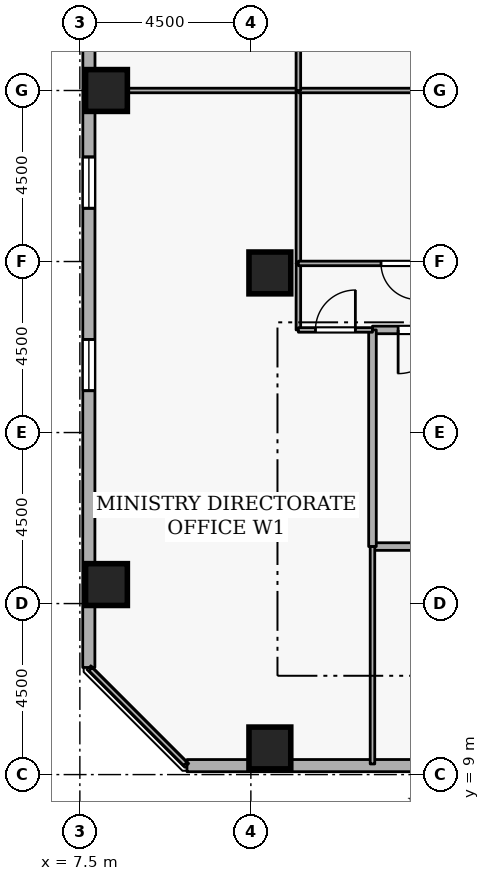
"""IFC4 building model, lengths in metres.
Left out: names, types, materials, properties, quantities, classifications, styles, units other than length and angle.
Written with IfcOpenShell. Run it as: python <this file> out.ifc"""

import sys

from ifc_helpers import new_model, si_unit, direction, frame, frame_2d, origin, origin_2d, place, context, subcontext, project, spatial, rectangle, extrude, element, fill, save


model = new_model("IFC4")
c1 = context("Model", 3, precision=1e-05, world=origin(), true_north=direction((0.0, 1.0)))
c2 = subcontext(c1, "Body", "Model", "MODEL_VIEW")
j1 = project(units=[si_unit("LENGTHUNIT", "METRE"), si_unit("PLANEANGLEUNIT", "RADIAN")], contexts=[c1])
p1 = place(None, origin())
s1 = spatial("IfcSite", under=j1, at=p1, CompositionType="ELEMENT")
p2 = place(p1, origin())
s2 = spatial("IfcBuilding", under=s1, at=p2, CompositionType="ELEMENT")
p3 = place(p2, frame((0.0, 0.0, 196.5)))
s3 = spatial("IfcBuildingStorey", under=s2, at=p3, CompositionType="ELEMENT", Elevation=196.5)
for number, where, z_axis, x_axis in (
    (1, (12.5, 9.7, 0.0), (0.0, 0.0, 1.0), (1.0, 0.0, 0.0)),
    (2, (8.2, 14.0, 0.0), (0.0, 0.0, 1.0), (1.0, 0.0, 0.0)),
    (3, (8.2, 27.0, 0.0), (0.0, 0.0, 1.0), (1.0, 0.0, 0.0)),
    (4, (12.5, 22.2, 0.0), (0.0, 0.0, 1.0), (1.0, 0.0, 0.0)),
):
    element("IfcColumn", number, at=place(p3, frame(where, z_axis=z_axis, x_axis=x_axis)), inside=s3, PredefinedType="COLUMN", context=c2, shape_type="SweptSolid", body=[
        extrude(rectangle(XDim=1.1, YDim=1.1, at=origin_2d()), origin(), (0.0, 0.0, 1.0), 3.6),
    ])
p4 = place(p3, frame((10.319, 9.235, 0.0), z_axis=(0.0, 0.0, 1.0), x_axis=(0.999999983007, 0.000184351399, 0.0)))
e5 = element("IfcWall", 5, at=p4, inside=s3, PredefinedType="STANDARD", context=c2, shape_type="SweptSolid", body=[
    extrude(rectangle(XDim=34.432, YDim=0.32, at=frame_2d((17.216, 0.0))), origin(), (0.0, 0.0, 1.0), 2.22),
])
p5 = place(p4, frame((6.6, 0.0, 0.72)))
e6 = element("IfcOpeningElement", 6, at=p5, cuts=e5, PredefinedType="OPENING", context=c2, shape_type="SweptSolid", body=[
    extrude(rectangle(XDim=1.35, YDim=1.05, at=frame_2d((0.675, 0.525))), frame((0.0, 0.17, 0.0), z_axis=(0.0, -1.0, 0.0), x_axis=(1.0, 0.0, 0.0)), (0.0, 0.0, 1.0), 0.34),
])
p6 = place(p4, frame((11.4, 0.0, 0.72)))
e7 = element("IfcOpeningElement", 7, at=p6, cuts=e5, PredefinedType="OPENING", context=c2, shape_type="SweptSolid", body=[
    extrude(rectangle(XDim=1.35, YDim=1.05, at=frame_2d((0.675, 0.525))), frame((0.0, 0.17, 0.0), z_axis=(0.0, -1.0, 0.0), x_axis=(1.0, 0.0, 0.0)), (0.0, 0.0, 1.0), 0.34),
])
p7 = place(p4, frame((21.0, 0.0, 0.72)))
e8 = element("IfcOpeningElement", 8, at=p7, cuts=e5, PredefinedType="OPENING", context=c2, shape_type="SweptSolid", body=[
    extrude(rectangle(XDim=1.35, YDim=1.05, at=frame_2d((0.675, 0.525))), frame((0.0, 0.17, 0.0), z_axis=(0.0, -1.0, 0.0), x_axis=(1.0, 0.0, 0.0)), (0.0, 0.0, 1.0), 0.34),
])
p8 = place(p4, frame((30.6, 0.0, 0.72)))
e9 = element("IfcOpeningElement", 9, at=p8, cuts=e5, PredefinedType="OPENING", context=c2, shape_type="SweptSolid", body=[
    extrude(rectangle(XDim=1.35, YDim=1.05, at=frame_2d((0.675, 0.525))), frame((0.0, 0.17, 0.0), z_axis=(0.0, -1.0, 0.0), x_axis=(1.0, 0.0, 0.0)), (0.0, 0.0, 1.0), 0.34),
])
p9 = place(p3, frame((7.742, 46.251, 0.0), z_axis=(0.0, 0.0, 1.0), x_axis=(-0.000184351399, -0.999999983007, 0.0)))
e10 = element("IfcWall", 10, at=p9, inside=s3, PredefinedType="STANDARD", context=c2, shape_type="SweptSolid", body=[
    extrude(rectangle(XDim=34.432, YDim=0.32, at=frame_2d((17.216, 0.0))), origin(), (0.0, 0.0, 1.0), 2.22),
])
p10 = place(p9, frame((1.8, 0.0, 0.72)))
e11 = element("IfcOpeningElement", 11, at=p10, cuts=e10, PredefinedType="OPENING", context=c2, shape_type="SweptSolid", body=[
    extrude(rectangle(XDim=1.35, YDim=1.05, at=frame_2d((0.675, 0.525))), frame((0.0, 0.17, 0.0), z_axis=(0.0, -1.0, 0.0), x_axis=(1.0, 0.0, 0.0)), (0.0, 0.0, 1.0), 0.34),
])
p11 = place(p9, frame((11.4, 0.0, 0.72)))
e12 = element("IfcOpeningElement", 12, at=p11, cuts=e10, PredefinedType="OPENING", context=c2, shape_type="SweptSolid", body=[
    extrude(rectangle(XDim=1.35, YDim=1.05, at=frame_2d((0.675, 0.525))), frame((0.0, 0.17, 0.0), z_axis=(0.0, -1.0, 0.0), x_axis=(1.0, 0.0, 0.0)), (0.0, 0.0, 1.0), 0.34),
])
p12 = place(p9, frame((16.2, 0.0, 0.72)))
e13 = element("IfcOpeningElement", 13, at=p12, cuts=e10, PredefinedType="OPENING", context=c2, shape_type="SweptSolid", body=[
    extrude(rectangle(XDim=1.35, YDim=1.05, at=frame_2d((0.675, 0.525))), frame((0.0, 0.17, 0.0), z_axis=(0.0, -1.0, 0.0), x_axis=(1.0, 0.0, 0.0)), (0.0, 0.0, 1.0), 0.34),
])
p13 = place(p9, frame((21.0, 0.0, 0.72)))
e14 = element("IfcOpeningElement", 14, at=p13, cuts=e10, PredefinedType="OPENING", context=c2, shape_type="SweptSolid", body=[
    extrude(rectangle(XDim=1.35, YDim=1.05, at=frame_2d((0.675, 0.525))), frame((0.0, 0.17, 0.0), z_axis=(0.0, -1.0, 0.0), x_axis=(1.0, 0.0, 0.0)), (0.0, 0.0, 1.0), 0.34),
])
p14 = place(p9, frame((25.8, 0.0, 0.72)))
e15 = element("IfcOpeningElement", 15, at=p14, cuts=e10, PredefinedType="OPENING", context=c2, shape_type="SweptSolid", body=[
    extrude(rectangle(XDim=1.35, YDim=1.05, at=frame_2d((0.675, 0.525))), frame((0.0, 0.17, 0.0), z_axis=(0.0, -1.0, 0.0), x_axis=(1.0, 0.0, 0.0)), (0.0, 0.0, 1.0), 0.34),
])
p15 = place(p3, frame((15.2, 15.0, 0.0), z_axis=(0.0, 0.0, 1.0), x_axis=(1.0, 0.0, 0.0)))
e16 = element("IfcWall", 16, at=p15, inside=s3, PredefinedType="STANDARD", context=c2, shape_type="SweptSolid", body=[
    extrude(rectangle(XDim=2.5, YDim=0.2, at=frame_2d((1.25, 0.0))), origin(), (0.0, 0.0, 1.0), 3.32),
])
p16 = place(p3, frame((17.7, 20.7, 0.0), z_axis=(0.0, 0.0, 1.0), x_axis=(-1.0, 0.0, 0.0)))
e17 = element("IfcWall", 17, at=p16, inside=s3, PredefinedType="STANDARD", context=c2, shape_type="SweptSolid", body=[
    extrude(rectangle(XDim=2.5, YDim=0.2, at=frame_2d((1.25, 0.0))), origin(), (0.0, 0.0, 1.0), 3.32),
])
p17 = place(p16, frame((0.675, 0.0, 0.0)))
e18 = element("IfcOpeningElement", 18, at=p17, cuts=e17, PredefinedType="OPENING", context=c2, shape_type="SweptSolid", body=[
    extrude(rectangle(XDim=1.15, YDim=2.1, at=frame_2d((0.575, 1.05))), frame((0.0, 0.11, 0.0), z_axis=(0.0, -1.0, 0.0), x_axis=(1.0, 0.0, 0.0)), (0.0, 0.0, 1.0), 0.22),
])
p18 = place(p3, frame((15.2, 20.7, 0.0), z_axis=(0.0, 0.0, 1.0), x_axis=(0.0, -1.0, 0.0)))
e19 = element("IfcWall", 19, at=p18, inside=s3, PredefinedType="STANDARD", context=c2, shape_type="SweptSolid", body=[
    extrude(rectangle(XDim=5.7, YDim=0.2, at=frame_2d((2.85, 0.0))), origin(), (0.0, 0.0, 1.0), 3.32),
])
p19 = place(p3, frame((7.78, 27.0, 0.0), z_axis=(0.0, 0.0, 1.0), x_axis=(1.0, 0.0, 0.0)))
e20 = element("IfcWall", 20, at=p19, inside=s3, PredefinedType="PARTITIONING", context=c2, shape_type="SweptSolid", body=[
    extrude(rectangle(XDim=5.47, YDim=0.12, at=frame_2d((2.735, 0.0))), origin(), (0.0, 0.0, 1.0), 1.785),
])
p20 = place(p3, frame((13.25, 27.0, 0.0), z_axis=(0.0, 0.0, 1.0), x_axis=(0.0, -1.0, 0.0)))
e21 = element("IfcWall", 21, at=p20, inside=s3, PredefinedType="PARTITIONING", context=c2, shape_type="SweptSolid", body=[
    extrude(rectangle(XDim=4.55, YDim=0.12, at=frame_2d((2.275, 0.0))), origin(), (0.0, 0.0, 1.0), 3.32),
])
p21 = place(p3, frame((13.25, 22.45, 0.0), z_axis=(0.0, 0.0, 1.0), x_axis=(0.0, -1.0, 0.0)))
e22 = element("IfcWall", 22, at=p21, inside=s3, PredefinedType="PARTITIONING", context=c2, shape_type="SweptSolid", body=[
    extrude(rectangle(XDim=1.75, YDim=0.12, at=frame_2d((0.875, 0.0))), origin(), (0.0, 0.0, 1.0), 3.32),
])
p22 = place(p3, frame((13.25, 20.7, 0.0), z_axis=(0.0, 0.0, 1.0), x_axis=(1.0, 0.0, 0.0)))
e23 = element("IfcWall", 23, at=p22, inside=s3, PredefinedType="PARTITIONING", context=c2, shape_type="SweptSolid", body=[
    extrude(rectangle(XDim=1.95, YDim=0.12, at=frame_2d((0.975, 0.0))), origin(), (0.0, 0.0, 1.0), 3.32),
])
p23 = place(p22, frame((0.45, 0.0, 0.0)))
e24 = element("IfcOpeningElement", 24, at=p23, cuts=e23, PredefinedType="OPENING", context=c2, shape_type="SweptSolid", body=[
    extrude(rectangle(XDim=1.05, YDim=2.1, at=frame_2d((0.525, 1.05))), frame((0.0, 0.07, 0.0), z_axis=(0.0, -1.0, 0.0), x_axis=(1.0, 0.0, 0.0)), (0.0, 0.0, 1.0), 0.14),
])
p24 = place(p3, frame((15.2, 15.0, 0.0), z_axis=(0.0, 0.0, 1.0), x_axis=(0.0, -1.0, 0.0)))
e25 = element("IfcWall", 25, at=p24, inside=s3, PredefinedType="PARTITIONING", context=c2, shape_type="SweptSolid", body=[
    extrude(rectangle(XDim=5.72, YDim=0.12, at=frame_2d((2.86, 0.0))), origin(), (0.0, 0.0, 1.0), 3.32),
])
p25 = place(p3, frame((10.275, 9.28, 0.0), z_axis=(0.0, 0.0, 1.0), x_axis=(-0.707106781187, 0.707106781187, 0.0)))
e26 = element("IfcWall", 26, at=p25, inside=s3, PredefinedType="PARTITIONING", context=c2, shape_type="SweptSolid", body=[
    extrude(rectangle(XDim=3.528, YDim=0.12, at=frame_2d((1.764, 0.0))), origin(), (0.0, 0.0, 1.0), 3.32),
])
p26 = place(p3, frame((13.25, 27.0, 0.0), z_axis=(0.0, 0.0, 1.0), x_axis=(1.0, 0.0, 0.0)))
e27 = element("IfcWall", 27, at=p26, inside=s3, PredefinedType="PARTITIONING", context=c2, shape_type="SweptSolid", body=[
    extrude(rectangle(XDim=5.3, YDim=0.12, at=frame_2d((2.65, 0.0))), origin(), (0.0, 0.0, 1.0), 1.785),
])
p27 = place(p3, frame((18.55, 22.45, 0.0), z_axis=(0.0, 0.0, 1.0), x_axis=(-1.0, 0.0, 0.0)))
e28 = element("IfcWall", 28, at=p27, inside=s3, PredefinedType="PARTITIONING", context=c2, shape_type="SweptSolid", body=[
    extrude(rectangle(XDim=5.3, YDim=0.12, at=frame_2d((2.65, 0.0))), origin(), (0.0, 0.0, 1.0), 3.32),
])
p28 = place(p27, frame((2.175, 0.0, 0.0)))
e29 = element("IfcOpeningElement", 29, at=p28, cuts=e28, PredefinedType="OPENING", context=c2, shape_type="SweptSolid", body=[
    extrude(rectangle(XDim=0.95, YDim=2.1, at=frame_2d((0.475, 1.05))), frame((0.0, 0.07, 0.0), z_axis=(0.0, -1.0, 0.0), x_axis=(1.0, 0.0, 0.0)), (0.0, 0.0, 1.0), 0.14),
])
p29 = place(p3, frame((13.25, 27.0, 0.0), z_axis=(0.0, 0.0, 1.0), x_axis=(0.0, 1.0, 0.0)))
e30 = element("IfcWall", 30, at=p29, inside=s3, PredefinedType="PARTITIONING", context=c2, shape_type="SweptSolid", body=[
    extrude(rectangle(XDim=2.3, YDim=0.12, at=frame_2d((1.15, 0.0))), origin(), (0.0, 0.0, 1.0), 3.32),
])
p30 = place(p13, origin())
e31 = element("IfcWindow", 31, at=p30, inside=s3, PartitioningType="SINGLE_PANEL", PredefinedType="WINDOW", context=c2, shape_type="SweptSolid", body=[
    extrude(rectangle(XDim=1.35, YDim=1.05, at=frame_2d((0.675, 0.525))), frame((0.0, 0.03, 0.0), z_axis=(0.0, -1.0, 0.0), x_axis=(1.0, 0.0, 0.0)), (0.0, 0.0, 1.0), 0.06),
])
fill(e14, e31)
p31 = place(p14, origin())
e32 = element("IfcWindow", 32, at=p31, inside=s3, PartitioningType="SINGLE_PANEL", PredefinedType="WINDOW", context=c2, shape_type="SweptSolid", body=[
    extrude(rectangle(XDim=1.35, YDim=1.05, at=frame_2d((0.675, 0.525))), frame((0.0, 0.03, 0.0), z_axis=(0.0, -1.0, 0.0), x_axis=(1.0, 0.0, 0.0)), (0.0, 0.0, 1.0), 0.06),
])
fill(e15, e32)
p32 = place(p17, origin())
e33 = element("IfcDoor", 33, at=p32, inside=s3, OperationType="SINGLE_SWING_RIGHT", PredefinedType="DOOR", context=c2, shape_type="SweptSolid", body=[
    extrude(rectangle(XDim=1.15, YDim=2.1, at=frame_2d((0.575, 1.05))), frame((0.0, 0.025, 0.0), z_axis=(0.0, -1.0, 0.0), x_axis=(1.0, 0.0, 0.0)), (0.0, 0.0, 1.0), 0.05),
])
fill(e18, e33)
p33 = place(p23, origin())
e34 = element("IfcDoor", 34, at=p33, inside=s3, OperationType="SINGLE_SWING_RIGHT", PredefinedType="DOOR", context=c2, shape_type="SweptSolid", body=[
    extrude(rectangle(XDim=1.05, YDim=2.1, at=frame_2d((0.525, 1.05))), frame((0.0, 0.025, 0.0), z_axis=(0.0, -1.0, 0.0), x_axis=(1.0, 0.0, 0.0)), (0.0, 0.0, 1.0), 0.05),
])
fill(e24, e34)
p34 = place(p28, origin())
e35 = element("IfcDoor", 35, at=p34, inside=s3, OperationType="SINGLE_SWING_LEFT", PredefinedType="DOOR", context=c2, shape_type="SweptSolid", body=[
    extrude(rectangle(XDim=0.95, YDim=2.1, at=frame_2d((0.475, 1.05))), frame((0.0, 0.025, 0.0), z_axis=(0.0, -1.0, 0.0), x_axis=(1.0, 0.0, 0.0)), (0.0, 0.0, 1.0), 0.05),
])
fill(e29, e35)
save(model, sys.argv[1])
